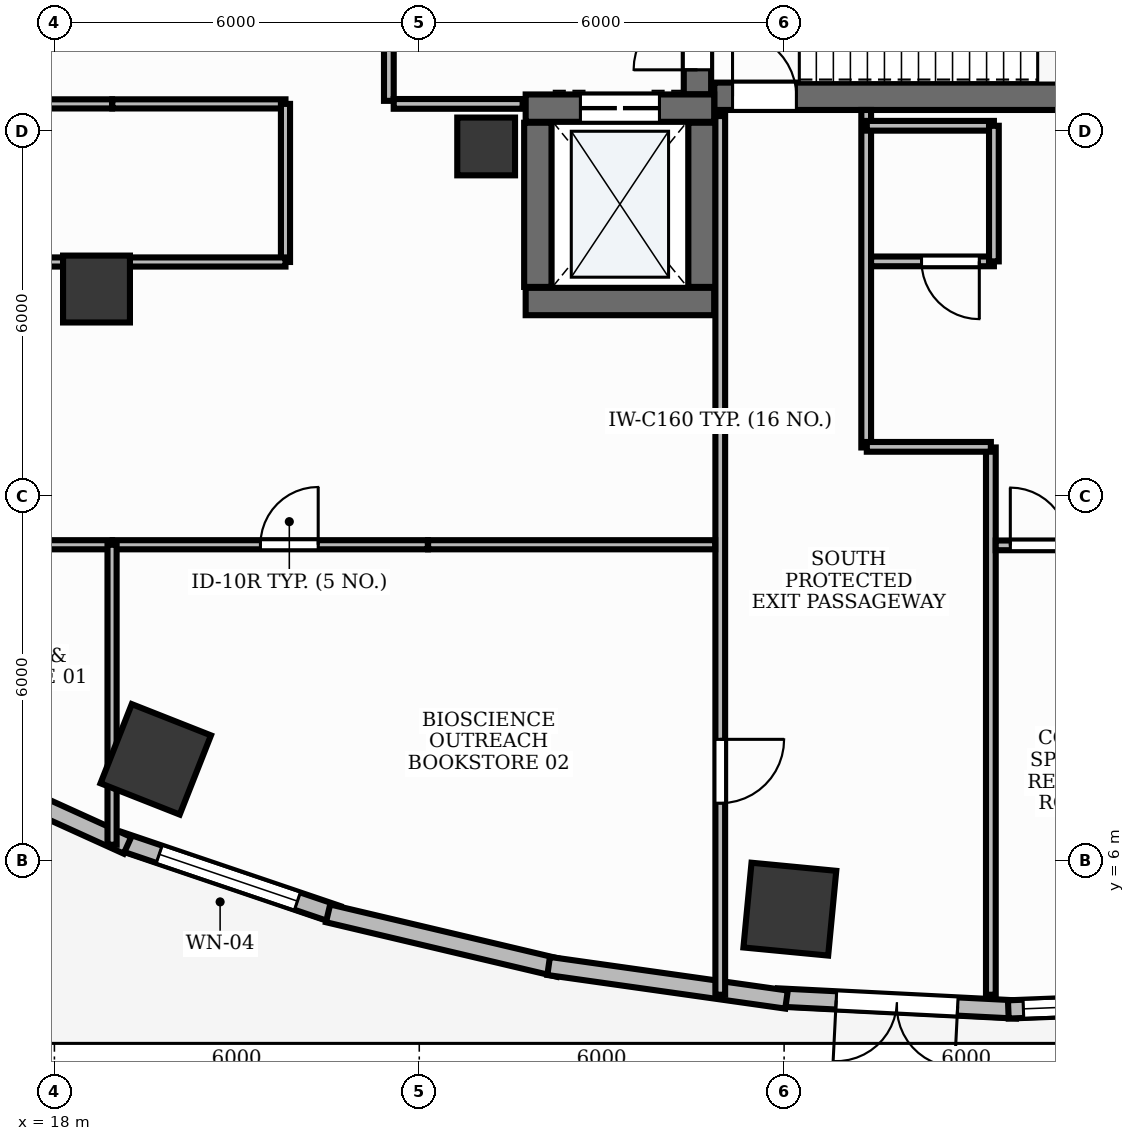
"""IFC4 building model, lengths in metres.
Left out: names, types, materials, properties, quantities, classifications, styles, units other than length and angle.
Written with IfcOpenShell. Run it as: python <this file> out.ifc"""

import sys

from ifc_helpers import new_model, si_unit, direction, frame, frame_2d, origin, origin_2d, place, context, subcontext, project, spatial, rectangle, extrude, element, fill, save


model = new_model("IFC4")
c1 = context("Model", 3, precision=1e-05, world=origin(), true_north=direction((0.0, 1.0)))
c2 = subcontext(c1, "Body", "Model", "MODEL_VIEW")
j1 = project(units=[si_unit("LENGTHUNIT", "METRE"), si_unit("PLANEANGLEUNIT", "RADIAN")], contexts=[c1])
p1 = place(None, origin())
s1 = spatial("IfcSite", under=j1, at=p1, CompositionType="ELEMENT")
p2 = place(p1, origin())
s2 = spatial("IfcBuilding", under=s1, at=p2, CompositionType="ELEMENT")
p3 = place(p2, origin())
s3 = spatial("IfcBuildingStorey", under=s2, at=p3, CompositionType="ELEMENT", Elevation=0.0)
p4 = place(p3, frame((28.852, 18.575, 0.0), z_axis=(0.0, 0.0, 1.0), x_axis=(1.0, 0.0, 0.0)))
e1 = element("IfcWall", 1, at=p4, inside=s3, PredefinedType="SHEAR", context=c2, shape_type="SweptSolid", body=[
    extrude(rectangle(XDim=8.248, YDim=0.45, at=frame_2d((4.124, 0.0))), origin(), (0.0, 0.0, 1.0), 5.1),
])
p5 = place(p4, frame((0.3, 0.0, 0.0)))
e2 = element("IfcOpeningElement", 2, at=p5, cuts=e1, PredefinedType="OPENING", context=c2, shape_type="SweptSolid", body=[
    extrude(rectangle(XDim=1.05, YDim=2.15, at=frame_2d((0.525, 1.075))), frame((0.0, 0.24, 0.0), z_axis=(0.0, -1.0, 0.0), x_axis=(1.0, 0.0, 0.0)), (0.0, 0.0, 1.0), 0.48),
])
p6 = place(p3, frame((28.575, 18.607, 0.0), z_axis=(0.0, 0.0, 1.0), x_axis=(0.0, 1.0, 0.0)))
e3 = element("IfcWall", 3, at=p6, inside=s3, PredefinedType="SHEAR", context=c2, shape_type="SweptSolid", body=[
    extrude(rectangle(XDim=3.283, YDim=0.45, at=frame_2d((1.642, 0.0))), origin(), (0.0, 0.0, 1.0), 5.1),
])
p7 = place(p6, frame((0.403, 0.0, 0.0)))
e4 = element("IfcOpeningElement", 4, at=p7, cuts=e3, PredefinedType="OPENING", context=c2, shape_type="SweptSolid", body=[
    extrude(rectangle(XDim=1.05, YDim=2.15, at=frame_2d((0.525, 1.075))), frame((0.0, 0.24, 0.0), z_axis=(0.0, -1.0, 0.0), x_axis=(1.0, 0.0, 0.0)), (0.0, 0.0, 1.0), 0.48),
])
p8 = place(p3, frame((25.75, 15.2, 0.0), z_axis=(0.0, 0.0, 1.0), x_axis=(1.0, 0.0, 0.0)))
e5 = element("IfcWall", 5, at=p8, inside=s3, PredefinedType="SHEAR", context=c2, shape_type="SweptSolid", body=[
    extrude(rectangle(XDim=3.1, YDim=0.45, at=frame_2d((1.55, 0.0))), origin(), (0.0, 0.0, 1.0), 5.1),
])
p9 = place(p3, frame((25.75, 18.38, 0.0), z_axis=(0.0, 0.0, 1.0), x_axis=(1.0, 0.0, 0.0)))
e6 = element("IfcWall", 6, at=p9, inside=s3, PredefinedType="SHEAR", context=c2, shape_type="SweptSolid", body=[
    extrude(rectangle(XDim=3.1, YDim=0.45, at=frame_2d((1.55, 0.0))), origin(), (0.0, 0.0, 1.0), 5.1),
])
p10 = place(p9, frame((0.9, 0.0, 0.0)))
e7 = element("IfcOpeningElement", 7, at=p10, cuts=e6, PredefinedType="OPENING", context=c2, shape_type="SweptSolid", body=[
    extrude(rectangle(XDim=1.3, YDim=2.2, at=frame_2d((0.65, 1.1))), frame((0.0, 0.24, 0.0), z_axis=(0.0, -1.0, 0.0), x_axis=(1.0, 0.0, 0.0)), (0.0, 0.0, 1.0), 0.48),
])
for number, where, z_axis, x_axis in (
    (8, (25.95, 15.44, 0.0), (0.0, 0.0, 1.0), (0.0, 1.0, 0.0)),
    (9, (28.65, 15.44, 0.0), (0.0, 0.0, 1.0), (0.0, 1.0, 0.0)),
):
    element("IfcWall", number, at=place(p3, frame(where, z_axis=z_axis, x_axis=x_axis)), inside=s3, PredefinedType="SHEAR", context=c2, shape_type="SweptSolid", body=[
        extrude(rectangle(XDim=2.7, YDim=0.45, at=frame_2d((1.35, 0.0))), origin(), (0.0, 0.0, 1.0), 5.1),
    ])
p11 = place(p3, frame((25.1, 17.75, -0.0), z_axis=(0.0, 0.0, 1.0), x_axis=(1.0, 0.0, 0.0)))
e10 = element("IfcColumn", 10, at=p11, inside=s3, PredefinedType="PILASTER", context=c2, shape_type="SweptSolid", body=[
    extrude(rectangle(XDim=0.95, YDim=0.95, at=origin_2d()), origin(), (0.0, 0.0, 1.0), 5.101),
])
p12 = place(p3, frame((18.692, 15.405, -0.0), z_axis=(0.0, 0.0, 1.0), x_axis=(1.0, 0.0, 0.0)))
e11 = element("IfcColumn", 11, at=p12, inside=s3, PredefinedType="COLUMN", context=c2, shape_type="SweptSolid", body=[
    extrude(rectangle(XDim=1.1, YDim=1.1, at=origin_2d()), origin(), (0.0, 0.0, 1.0), 5.101),
])
for number, where, z_axis, x_axis in (
    (12, (19.667, 7.671, -0.0), (0.0, 0.0, 1.0), (-0.93, 0.367, 0.0)),
    (13, (30.094, 5.208, -0.0), (0.0, 0.0, 1.0), (-0.995, 0.095, 0.0)),
):
    element("IfcColumn", number, at=place(p3, frame(where, z_axis=z_axis, x_axis=x_axis)), inside=s3, PredefinedType="COLUMN", context=c2, shape_type="SweptSolid", body=[
        extrude(rectangle(XDim=1.4, YDim=1.4, at=origin_2d()), origin(), (0.0, 0.0, 1.0), 5.101),
    ])
p13 = place(p3, frame((19.065, 6.333, 0.0), z_axis=(0.0, 0.0, 1.0), x_axis=(0.947034337234, -0.321132315564, 0.0)))
e14 = element("IfcWall", 14, at=p13, inside=s3, PredefinedType="STANDARD", context=c2, shape_type="SweptSolid", body=[
    extrude(rectangle(XDim=3.79, YDim=0.3, at=frame_2d((1.895, 0.0))), origin(), (0.0, 0.0, 1.0), 5.1),
])
p14 = place(p13, frame((0.695, 0.0, 1.5)))
e15 = element("IfcOpeningElement", 15, at=p14, cuts=e14, PredefinedType="OPENING", context=c2, shape_type="SweptSolid", body=[
    extrude(rectangle(XDim=2.4, YDim=1.2, at=frame_2d((1.2, 0.6))), frame((0.0, 0.165, 0.0), z_axis=(0.0, -1.0, 0.0), x_axis=(1.0, 0.0, 0.0)), (0.0, 0.0, 1.0), 0.33),
])
p15 = place(p3, frame((33.821, 3.558, 0.0), z_axis=(0.0, 0.0, 1.0), x_axis=(-0.99873153138, 0.050352042933, 0.0)))
e16 = element("IfcWall", 16, at=p15, inside=s3, PredefinedType="STANDARD", context=c2, shape_type="SweptSolid", body=[
    extrude(rectangle(XDim=3.937, YDim=0.3, at=frame_2d((1.969, 0.0))), origin(), (0.0, 0.0, 1.0), 5.1),
])
p16 = place(p15, frame((0.969, 0.0, 0.0)))
e17 = element("IfcOpeningElement", 17, at=p16, cuts=e16, PredefinedType="OPENING", context=c2, shape_type="SweptSolid", body=[
    extrude(rectangle(XDim=2.0, YDim=2.3, at=frame_2d((1.0, 1.15))), frame((0.0, 0.165, 0.0), z_axis=(0.0, -1.0, 0.0), x_axis=(1.0, 0.0, 0.0)), (0.0, 0.0, 1.0), 0.33),
])
p17 = place(p3, frame((33.687, 3.558, 0.0), z_axis=(0.0, 0.0, 1.0), x_axis=(0.999247008469, 0.038799691558, 0.0)))
e18 = element("IfcWall", 18, at=p17, inside=s3, PredefinedType="STANDARD", context=c2, shape_type="SweptSolid", body=[
    extrude(rectangle(XDim=3.939, YDim=0.3, at=frame_2d((1.969, 0.0))), origin(), (0.0, 0.0, 1.0), 5.1),
])
p18 = place(p17, frame((0.248, 0.0, 1.5)))
e19 = element("IfcOpeningElement", 19, at=p18, cuts=e18, PredefinedType="OPENING", context=c2, shape_type="SweptSolid", body=[
    extrude(rectangle(XDim=2.4, YDim=1.2, at=frame_2d((1.2, 0.6))), frame((0.0, 0.165, 0.0), z_axis=(0.0, -1.0, 0.0), x_axis=(1.0, 0.0, 0.0)), (0.0, 0.0, 1.0), 0.33),
])
p19 = place(p3, frame((15.796, 7.802, 0.0), z_axis=(0.0, 0.0, 1.0), x_axis=(0.910623406862, -0.413237233166, 0.0)))
e20 = element("IfcWall", 20, at=p19, inside=s3, PredefinedType="STANDARD", context=c2, shape_type="SweptSolid", body=[
    extrude(rectangle(XDim=3.74, YDim=0.3, at=frame_2d((1.87, 0.0))), origin(), (0.0, 0.0, 1.0), 5.1),
])
p20 = place(p3, frame((22.5, 5.138, 0.0), z_axis=(0.0, 0.0, 1.0), x_axis=(0.973197600754, -0.229970497863, 0.0)))
e21 = element("IfcWall", 21, at=p20, inside=s3, PredefinedType="STANDARD", context=c2, shape_type="SweptSolid", body=[
    extrude(rectangle(XDim=3.901, YDim=0.3, at=frame_2d((1.951, 0.0))), origin(), (0.0, 0.0, 1.0), 5.1),
])
p21 = place(p3, frame((26.128, 4.273, 0.0), z_axis=(0.0, 0.0, 1.0), x_axis=(0.990165832998, -0.139898617443, 0.0)))
e22 = element("IfcWall", 22, at=p21, inside=s3, PredefinedType="STANDARD", context=c2, shape_type="SweptSolid", body=[
    extrude(rectangle(XDim=3.951, YDim=0.3, at=frame_2d((1.976, 0.0))), origin(), (0.0, 0.0, 1.0), 5.1),
])
p22 = place(p3, frame((23.5, 18.5, 0.0), z_axis=(0.0, 0.0, 1.0), x_axis=(0.0, 1.0, 0.0)))
e23 = element("IfcWall", 23, at=p22, inside=s3, PredefinedType="PARTITIONING", context=c2, shape_type="SweptSolid", body=[
    extrude(rectangle(XDim=3.4, YDim=0.16, at=frame_2d((1.7, 0.0))), origin(), (0.0, 0.0, 1.0), 4.11),
])
p23 = place(p22, frame((1.175, 0.0, 0.0)))
e24 = element("IfcOpeningElement", 24, at=p23, cuts=e23, PredefinedType="OPENING", context=c2, shape_type="SweptSolid", body=[
    extrude(rectangle(XDim=1.05, YDim=2.15, at=frame_2d((0.525, 1.075))), frame((0.0, 0.095, 0.0), z_axis=(0.0, -1.0, 0.0), x_axis=(1.0, 0.0, 0.0)), (0.0, 0.0, 1.0), 0.19),
])
p24 = place(p3, frame((23.58, 18.45, 0.0), z_axis=(0.0, 0.0, 1.0), x_axis=(1.0, 0.0, 0.0)))
e25 = element("IfcWall", 25, at=p24, inside=s3, PredefinedType="PARTITIONING", context=c2, shape_type="SweptSolid", body=[
    extrude(rectangle(XDim=2.12, YDim=0.16, at=frame_2d((1.06, 0.0))), origin(), (0.0, 0.0, 1.0), 4.11),
])
p25 = place(p3, frame((28.95, 18.25, 0.0), z_axis=(0.0, 0.0, 1.0), x_axis=(0.0, -1.0, 0.0)))
e26 = element("IfcWall", 26, at=p25, inside=s3, PredefinedType="PARTITIONING", context=c2, shape_type="SweptSolid", body=[
    extrude(rectangle(XDim=14.45, YDim=0.16, at=frame_2d((7.225, 0.0))), origin(), (0.0, 0.0, 1.0), 4.11),
])
p26 = place(p25, frame((10.25, 0.0, 0.0)))
e27 = element("IfcOpeningElement", 27, at=p26, cuts=e26, PredefinedType="OPENING", context=c2, shape_type="SweptSolid", body=[
    extrude(rectangle(XDim=1.05, YDim=2.15, at=frame_2d((0.525, 1.075))), frame((0.0, 0.095, 0.0), z_axis=(0.0, -1.0, 0.0), x_axis=(1.0, 0.0, 0.0)), (0.0, 0.0, 1.0), 0.19),
])
p27 = place(p3, frame((31.35, 12.8, 0.0), z_axis=(0.0, 0.0, 1.0), x_axis=(0.0, 1.0, 0.0)))
e28 = element("IfcWall", 28, at=p27, inside=s3, PredefinedType="PARTITIONING", context=c2, shape_type="SweptSolid", body=[
    extrude(rectangle(XDim=5.55, YDim=0.16, at=frame_2d((2.775, 0.0))), origin(), (0.0, 0.0, 1.0), 4.11),
])
p28 = place(p3, frame((33.4, 3.8, 0.0), z_axis=(0.0, 0.0, 1.0), x_axis=(0.0, 1.0, 0.0)))
e29 = element("IfcWall", 29, at=p28, inside=s3, PredefinedType="PARTITIONING", context=c2, shape_type="SweptSolid", body=[
    extrude(rectangle(XDim=9.0, YDim=0.16, at=frame_2d((4.5, 0.0))), origin(), (0.0, 0.0, 1.0), 4.11),
])
p29 = place(p3, frame((33.45, 15.86, 0.0), z_axis=(0.0, 0.0, 1.0), x_axis=(-1.0, 0.0, 0.0)))
e30 = element("IfcWall", 30, at=p29, inside=s3, PredefinedType="PARTITIONING", context=c2, shape_type="SweptSolid", body=[
    extrude(rectangle(XDim=2.02, YDim=0.16, at=frame_2d((1.01, 0.0))), origin(), (0.0, 0.0, 1.0), 4.11),
])
p30 = place(p29, frame((0.24, 0.0, 0.0)))
e31 = element("IfcOpeningElement", 31, at=p30, cuts=e30, PredefinedType="OPENING", context=c2, shape_type="SweptSolid", body=[
    extrude(rectangle(XDim=0.95, YDim=2.15, at=frame_2d((0.475, 1.075))), frame((0.0, 0.095, 0.0), z_axis=(0.0, -1.0, 0.0), x_axis=(1.0, 0.0, 0.0)), (0.0, 0.0, 1.0), 0.19),
])
p31 = place(p3, frame((18.958, 11.2, 0.0), z_axis=(0.0, 0.0, 1.0), x_axis=(1.0, 0.0, 0.0)))
e32 = element("IfcWall", 32, at=p31, inside=s3, PredefinedType="PARTITIONING", context=c2, shape_type="SweptSolid", body=[
    extrude(rectangle(XDim=5.183, YDim=0.15, at=frame_2d((2.591, 0.0))), origin(), (0.0, 0.0, 1.0), 4.11),
])
p32 = place(p31, frame((2.43, 0.0, 0.0)))
e33 = element("IfcOpeningElement", 33, at=p32, cuts=e32, PredefinedType="OPENING", context=c2, shape_type="SweptSolid", body=[
    extrude(rectangle(XDim=0.95, YDim=2.15, at=frame_2d((0.475, 1.075))), frame((0.0, 0.09, 0.0), z_axis=(0.0, -1.0, 0.0), x_axis=(1.0, 0.0, 0.0)), (0.0, 0.0, 1.0), 0.18),
])
p33 = place(p3, frame((33.48, 11.19, 0.0), z_axis=(0.0, 0.0, 1.0), x_axis=(1.0, 0.0, 0.0)))
e34 = element("IfcWall", 34, at=p33, inside=s3, PredefinedType="PARTITIONING", context=c2, shape_type="SweptSolid", body=[
    extrude(rectangle(XDim=3.068, YDim=0.16, at=frame_2d((1.534, 0.0))), origin(), (0.0, 0.0, 1.0), 4.11),
])
p34 = place(p33, frame((0.24, 0.0, 0.0)))
e35 = element("IfcOpeningElement", 35, at=p34, cuts=e34, PredefinedType="OPENING", context=c2, shape_type="SweptSolid", body=[
    extrude(rectangle(XDim=0.95, YDim=2.15, at=frame_2d((0.475, 1.075))), frame((0.0, 0.095, 0.0), z_axis=(0.0, -1.0, 0.0), x_axis=(1.0, 0.0, 0.0)), (0.0, 0.0, 1.0), 0.19),
])
p35 = place(p3, frame((31.36, 18.09, 0.0), z_axis=(0.0, 0.0, 1.0), x_axis=(1.0, 0.0, 0.0)))
e36 = element("IfcWall", 36, at=p35, inside=s3, PredefinedType="PARTITIONING", context=c2, shape_type="SweptSolid", body=[
    extrude(rectangle(XDim=2.09, YDim=0.16, at=frame_2d((1.045, 0.0))), origin(), (0.0, 0.0, 1.0), 4.11),
])
p36 = place(p3, frame((33.45, 18.09, 0.0), z_axis=(0.0, 0.0, 1.0), x_axis=(0.0, -1.0, 0.0)))
e37 = element("IfcWall", 37, at=p36, inside=s3, PredefinedType="PARTITIONING", context=c2, shape_type="SweptSolid", body=[
    extrude(rectangle(XDim=2.23, YDim=0.16, at=frame_2d((1.115, 0.0))), origin(), (0.0, 0.0, 1.0), 4.11),
])
p37 = place(p3, frame((15.644, 18.45, 0.0), z_axis=(0.0, 0.0, 1.0), x_axis=(1.0, 0.0, 0.0)))
e38 = element("IfcWall", 38, at=p37, inside=s3, PredefinedType="PARTITIONING", context=c2, shape_type="SweptSolid", body=[
    extrude(rectangle(XDim=3.304, YDim=0.15, at=frame_2d((1.652, 0.0))), origin(), (0.0, 0.0, 1.0), 4.11),
])
p38 = place(p3, frame((18.952, 18.45, 0.0), z_axis=(0.0, 0.0, 1.0), x_axis=(1.0, 0.0, 0.0)))
e39 = element("IfcWall", 39, at=p38, inside=s3, PredefinedType="PARTITIONING", context=c2, shape_type="SweptSolid", body=[
    extrude(rectangle(XDim=2.848, YDim=0.15, at=frame_2d((1.424, 0.0))), origin(), (0.0, 0.0, 1.0), 4.11),
])
p39 = place(p3, frame((21.8, 18.45, 0.0), z_axis=(0.0, 0.0, 1.0), x_axis=(0.0, -1.0, 0.0)))
e40 = element("IfcWall", 40, at=p39, inside=s3, PredefinedType="PARTITIONING", context=c2, shape_type="SweptSolid", body=[
    extrude(rectangle(XDim=2.6, YDim=0.15, at=frame_2d((1.3, 0.0))), origin(), (0.0, 0.0, 1.0), 4.11),
])
p40 = place(p3, frame((21.8, 15.85, 0.0), z_axis=(0.0, 0.0, 1.0), x_axis=(-1.0, 0.0, 0.0)))
e41 = element("IfcWall", 41, at=p40, inside=s3, PredefinedType="PARTITIONING", context=c2, shape_type="SweptSolid", body=[
    extrude(rectangle(XDim=2.848, YDim=0.15, at=frame_2d((1.424, 0.0))), origin(), (0.0, 0.0, 1.0), 4.11),
])
p41 = place(p3, frame((18.948, 15.85, 0.0), z_axis=(0.0, 0.0, 1.0), x_axis=(-1.0, 0.0, 0.0)))
e42 = element("IfcWall", 42, at=p41, inside=s3, PredefinedType="PARTITIONING", context=c2, shape_type="SweptSolid", body=[
    extrude(rectangle(XDim=3.304, YDim=0.15, at=frame_2d((1.652, 0.0))), origin(), (0.0, 0.0, 1.0), 4.11),
])
p42 = place(p3, frame((15.523, 11.2, 0.0), z_axis=(0.0, 0.0, 1.0), x_axis=(1.0, 0.0, 0.0)))
e43 = element("IfcWall", 43, at=p42, inside=s3, PredefinedType="PARTITIONING", context=c2, shape_type="SweptSolid", body=[
    extrude(rectangle(XDim=3.425, YDim=0.15, at=frame_2d((1.712, 0.0))), origin(), (0.0, 0.0, 1.0), 4.11),
])
p43 = place(p3, frame((18.948, 11.2, 0.0), z_axis=(0.0, 0.0, 1.0), x_axis=(0.0, -1.0, 0.0)))
e44 = element("IfcWall", 44, at=p43, inside=s3, PredefinedType="PARTITIONING", context=c2, shape_type="SweptSolid", body=[
    extrude(rectangle(XDim=4.933, YDim=0.15, at=frame_2d((2.467, 0.0))), origin(), (0.0, 0.0, 1.0), 4.11),
])
p44 = place(p3, frame((24.145, 11.2, 0.0), z_axis=(0.0, 0.0, 1.0), x_axis=(1.0, 0.0, 0.0)))
e45 = element("IfcWall", 45, at=p44, inside=s3, PredefinedType="PARTITIONING", context=c2, shape_type="SweptSolid", body=[
    extrude(rectangle(XDim=4.721, YDim=0.15, at=frame_2d((2.36, 0.0))), origin(), (0.0, 0.0, 1.0), 4.11),
])
p45 = place(p3, frame((33.4, 12.81, 0.0), z_axis=(0.0, 0.0, 1.0), x_axis=(-1.0, 0.0, 0.0)))
e46 = element("IfcWall", 46, at=p45, inside=s3, PredefinedType="PARTITIONING", context=c2, shape_type="SweptSolid", body=[
    extrude(rectangle(XDim=2.04, YDim=0.16, at=frame_2d((1.02, 0.0))), origin(), (0.0, 0.0, 1.0), 4.11),
])
p46 = place(p14, origin())
e47 = element("IfcWindow", 47, at=p46, inside=s3, PartitioningType="DOUBLE_PANEL_HORIZONTAL", PredefinedType="WINDOW", context=c2, shape_type="SweptSolid", body=[
    extrude(rectangle(XDim=2.4, YDim=1.2, at=frame_2d((1.2, 0.6))), frame((0.0, 0.03, 0.0), z_axis=(0.0, -1.0, 0.0), x_axis=(1.0, 0.0, 0.0)), (0.0, 0.0, 1.0), 0.06),
])
fill(e15, e47)
p47 = place(p16, origin())
e48 = element("IfcDoor", 48, at=p47, inside=s3, OperationType="DOUBLE_DOOR_SINGLE_SWING", PredefinedType="DOOR", context=c2, shape_type="SweptSolid", body=[
    extrude(rectangle(XDim=2.0, YDim=2.3, at=frame_2d((1.0, 1.15))), frame((0.0, 0.025, 0.0), z_axis=(0.0, -1.0, 0.0), x_axis=(1.0, 0.0, 0.0)), (0.0, 0.0, 1.0), 0.05),
])
fill(e17, e48)
p48 = place(p18, origin())
e49 = element("IfcWindow", 49, at=p48, inside=s3, PartitioningType="DOUBLE_PANEL_HORIZONTAL", PredefinedType="WINDOW", context=c2, shape_type="SweptSolid", body=[
    extrude(rectangle(XDim=2.4, YDim=1.2, at=frame_2d((1.2, 0.6))), frame((0.0, 0.03, 0.0), z_axis=(0.0, -1.0, 0.0), x_axis=(1.0, 0.0, 0.0)), (0.0, 0.0, 1.0), 0.06),
])
fill(e19, e49)
p49 = place(p7, origin())
e50 = element("IfcDoor", 50, at=p49, inside=s3, OperationType="SINGLE_SWING_LEFT", PredefinedType="DOOR", context=c2, shape_type="SweptSolid", body=[
    extrude(rectangle(XDim=1.05, YDim=2.15, at=frame_2d((0.525, 1.075))), frame((0.0, 0.025, 0.0), z_axis=(0.0, -1.0, 0.0), x_axis=(1.0, 0.0, 0.0)), (0.0, 0.0, 1.0), 0.05),
])
fill(e4, e50)
p50 = place(p5, origin())
e51 = element("IfcDoor", 51, at=p50, inside=s3, OperationType="SINGLE_SWING_LEFT", PredefinedType="DOOR", context=c2, shape_type="SweptSolid", body=[
    extrude(rectangle(XDim=1.05, YDim=2.15, at=frame_2d((0.525, 1.075))), frame((0.0, 0.025, 0.0), z_axis=(0.0, -1.0, 0.0), x_axis=(1.0, 0.0, 0.0)), (0.0, 0.0, 1.0), 0.05),
])
fill(e2, e51)
p51 = place(p10, origin())
e52 = element("IfcDoor", 52, at=p51, inside=s3, OperationType="DOUBLE_DOOR_SLIDING", PredefinedType="DOOR", context=c2, shape_type="SweptSolid", body=[
    extrude(rectangle(XDim=1.3, YDim=2.2, at=frame_2d((0.65, 1.1))), frame((0.0, 0.025, 0.0), z_axis=(0.0, -1.0, 0.0), x_axis=(1.0, 0.0, 0.0)), (0.0, 0.0, 1.0), 0.05),
])
fill(e7, e52)
p52 = place(p26, origin())
e53 = element("IfcDoor", 53, at=p52, inside=s3, OperationType="SINGLE_SWING_LEFT", PredefinedType="DOOR", context=c2, shape_type="SweptSolid", body=[
    extrude(rectangle(XDim=1.05, YDim=2.15, at=frame_2d((0.525, 1.075))), frame((0.0, 0.025, 0.0), z_axis=(0.0, -1.0, 0.0), x_axis=(1.0, 0.0, 0.0)), (0.0, 0.0, 1.0), 0.05),
])
fill(e27, e53)
p53 = place(p30, origin())
e54 = element("IfcDoor", 54, at=p53, inside=s3, OperationType="SINGLE_SWING_LEFT", PredefinedType="DOOR", context=c2, shape_type="SweptSolid", body=[
    extrude(rectangle(XDim=0.95, YDim=2.15, at=frame_2d((0.475, 1.075))), frame((0.0, 0.025, 0.0), z_axis=(0.0, -1.0, 0.0), x_axis=(1.0, 0.0, 0.0)), (0.0, 0.0, 1.0), 0.05),
])
fill(e31, e54)
p54 = place(p32, origin())
e55 = element("IfcDoor", 55, at=p54, inside=s3, OperationType="SINGLE_SWING_RIGHT", PredefinedType="DOOR", context=c2, shape_type="SweptSolid", body=[
    extrude(rectangle(XDim=0.95, YDim=2.15, at=frame_2d((0.475, 1.075))), frame((0.0, 0.025, 0.0), z_axis=(0.0, -1.0, 0.0), x_axis=(1.0, 0.0, 0.0)), (0.0, 0.0, 1.0), 0.05),
])
fill(e33, e55)
p55 = place(p34, origin())
e56 = element("IfcDoor", 56, at=p55, inside=s3, OperationType="SINGLE_SWING_LEFT", PredefinedType="DOOR", context=c2, shape_type="SweptSolid", body=[
    extrude(rectangle(XDim=0.95, YDim=2.15, at=frame_2d((0.475, 1.075))), frame((0.0, 0.025, 0.0), z_axis=(0.0, -1.0, 0.0), x_axis=(1.0, 0.0, 0.0)), (0.0, 0.0, 1.0), 0.05),
])
fill(e35, e56)
save(model, sys.argv[1])
